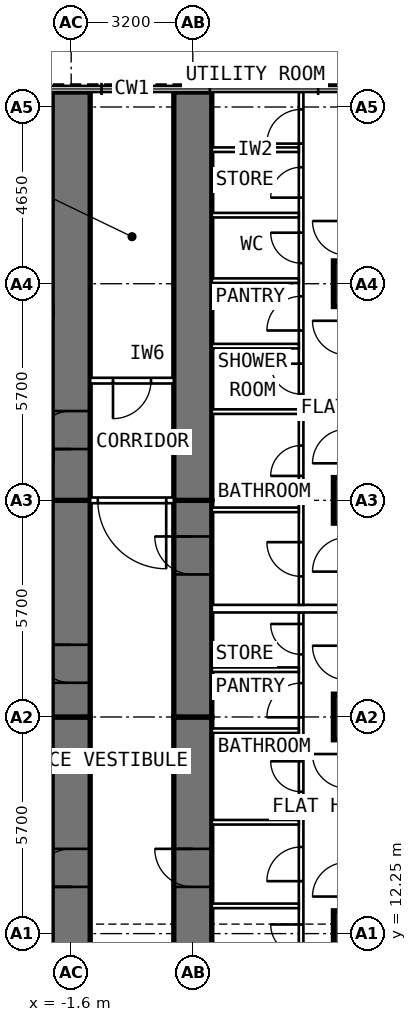
"""IFC4 building model, lengths in metres.
Left out: names, types, materials, properties, quantities, classifications, styles, units other than length and angle.
Written with IfcOpenShell. Run it as: python <this file> out.ifc"""

import sys

from ifc_helpers import new_model, si_unit, direction, frame, frame_2d, origin, origin_2d, place, context, subcontext, project, spatial, rectangle, extrude, element, fill, save


model = new_model("IFC4")
c1 = context("Model", 3, precision=1e-05, world=origin(), true_north=direction((0.0, 1.0)))
c2 = subcontext(c1, "Body", "Model", "MODEL_VIEW")
j1 = project(units=[si_unit("LENGTHUNIT", "METRE"), si_unit("PLANEANGLEUNIT", "RADIAN")], contexts=[c1])
p1 = place(None, origin())
s1 = spatial("IfcSite", under=j1, at=p1, CompositionType="ELEMENT")
p2 = place(p1, origin())
s2 = spatial("IfcBuilding", under=s1, at=p2, CompositionType="ELEMENT")
p3 = place(p2, frame((0.0, 0.0, 88.0)))
s3 = spatial("IfcBuildingStorey", under=s2, at=p3, CompositionType="ELEMENT", Elevation=88.0)
for number, where, z_axis, x_axis in (
    (1, (5.9, 12.25, 0.0), (0.0, 0.0, 1.0), (0.0, 1.0, 0.0)),
    (2, (5.9, 17.95, 0.0), (0.0, 0.0, 1.0), (0.0, 1.0, 0.0)),
    (3, (5.9, 23.65, 0.0), (0.0, 0.0, 1.0), (0.0, 1.0, 0.0)),
    (4, (5.9, 29.35, 0.0), (0.0, 0.0, 1.0), (0.0, 1.0, 0.0)),
):
    element("IfcColumn", number, at=place(p3, frame(where, z_axis=z_axis, x_axis=x_axis)), inside=s3, PredefinedType="COLUMN", context=c2, shape_type="SweptSolid", body=[
        extrude(rectangle(XDim=1.2, YDim=1.2, at=origin_2d()), origin(), (0.0, 0.0, 1.0), 3.6),
    ])
p4 = place(p3, frame((-1.6, 9.6, 0.0), z_axis=(0.0, 0.0, 1.0), x_axis=(0.0, 1.0, 0.0)))
e5 = element("IfcWall", 5, at=p4, inside=s3, PredefinedType="SHEAR", context=c2, shape_type="SweptSolid", body=[
    extrude(rectangle(XDim=8.35, YDim=1.0, at=frame_2d((4.175, 0.0))), origin(), (0.0, 0.0, 1.0), 3.6),
])
p5 = place(p4, frame((3.88, 0.0, 0.0)))
e6 = element("IfcOpeningElement", 6, at=p5, cuts=e5, PredefinedType="OPENING", context=c2, shape_type="SweptSolid", body=[
    extrude(rectangle(XDim=1.0, YDim=2.1, at=frame_2d((0.5, 1.05))), frame((0.0, 0.512, 0.0), z_axis=(0.0, -1.0, 0.0), x_axis=(1.0, 0.0, 0.0)), (0.0, 0.0, 1.0), 1.024),
])
p6 = place(p3, frame((-1.6, 17.95, 0.0), z_axis=(0.0, 0.0, 1.0), x_axis=(0.0, 1.0, 0.0)))
e7 = element("IfcWall", 7, at=p6, inside=s3, PredefinedType="SHEAR", context=c2, shape_type="SweptSolid", body=[
    extrude(rectangle(XDim=5.7, YDim=1.0, at=frame_2d((2.85, 0.0))), origin(), (0.0, 0.0, 1.0), 3.6),
])
p7 = place(p6, frame((0.9, 0.0, 0.0)))
e8 = element("IfcOpeningElement", 8, at=p7, cuts=e7, PredefinedType="OPENING", context=c2, shape_type="SweptSolid", body=[
    extrude(rectangle(XDim=1.0, YDim=2.1, at=frame_2d((0.5, 1.05))), frame((0.0, 0.512, 0.0), z_axis=(0.0, -1.0, 0.0), x_axis=(1.0, 0.0, 0.0)), (0.0, 0.0, 1.0), 1.024),
])
p8 = place(p3, frame((-1.6, 23.65, 0.0), z_axis=(0.0, 0.0, 1.0), x_axis=(0.0, 1.0, 0.0)))
e9 = element("IfcWall", 9, at=p8, inside=s3, PredefinedType="SHEAR", context=c2, shape_type="SweptSolid", body=[
    extrude(rectangle(XDim=10.745, YDim=1.0, at=frame_2d((5.373, 0.0))), origin(), (0.0, 0.0, 1.0), 3.6),
])
p9 = place(p8, frame((1.35, 0.0, 0.0)))
e10 = element("IfcOpeningElement", 10, at=p9, cuts=e9, PredefinedType="OPENING", context=c2, shape_type="SweptSolid", body=[
    extrude(rectangle(XDim=1.0, YDim=2.1, at=frame_2d((0.5, 1.05))), frame((0.0, 0.512, 0.0), z_axis=(0.0, -1.0, 0.0), x_axis=(1.0, 0.0, 0.0)), (0.0, 0.0, 1.0), 1.024),
])
p10 = place(p3, frame((1.6, 9.6, 0.0), z_axis=(0.0, 0.0, 1.0), x_axis=(0.0, 1.0, 0.0)))
e11 = element("IfcWall", 11, at=p10, inside=s3, PredefinedType="SHEAR", context=c2, shape_type="SweptSolid", body=[
    extrude(rectangle(XDim=8.35, YDim=1.0, at=frame_2d((4.175, 0.0))), origin(), (0.0, 0.0, 1.0), 3.6),
])
p11 = place(p10, frame((3.88, 0.0, 0.0)))
e12 = element("IfcOpeningElement", 12, at=p11, cuts=e11, PredefinedType="OPENING", context=c2, shape_type="SweptSolid", body=[
    extrude(rectangle(XDim=1.0, YDim=2.1, at=frame_2d((0.5, 1.05))), frame((0.0, 0.512, 0.0), z_axis=(0.0, -1.0, 0.0), x_axis=(1.0, 0.0, 0.0)), (0.0, 0.0, 1.0), 1.024),
])
p12 = place(p3, frame((1.6, 17.95, 0.0), z_axis=(0.0, 0.0, 1.0), x_axis=(0.0, 1.0, 0.0)))
e13 = element("IfcWall", 13, at=p12, inside=s3, PredefinedType="SHEAR", context=c2, shape_type="SweptSolid", body=[
    extrude(rectangle(XDim=5.7, YDim=1.0, at=frame_2d((2.85, 0.0))), origin(), (0.0, 0.0, 1.0), 3.6),
])
p13 = place(p12, frame((3.75, 0.0, 0.0)))
e14 = element("IfcOpeningElement", 14, at=p13, cuts=e13, PredefinedType="OPENING", context=c2, shape_type="SweptSolid", body=[
    extrude(rectangle(XDim=1.0, YDim=2.1, at=frame_2d((0.5, 1.05))), frame((0.0, 0.512, 0.0), z_axis=(0.0, -1.0, 0.0), x_axis=(1.0, 0.0, 0.0)), (0.0, 0.0, 1.0), 1.024),
])
p14 = place(p3, frame((1.6, 23.65, 0.0), z_axis=(0.0, 0.0, 1.0), x_axis=(0.0, 1.0, 0.0)))
e15 = element("IfcWall", 15, at=p14, inside=s3, PredefinedType="SHEAR", context=c2, shape_type="SweptSolid", body=[
    extrude(rectangle(XDim=10.745, YDim=1.0, at=frame_2d((5.373, 0.0))), origin(), (0.0, 0.0, 1.0), 3.6),
])
p15 = place(p3, frame((-2.1, 17.95, 0.0), z_axis=(0.0, 0.0, 1.0), x_axis=(-1.0, 0.0, 0.0)))
e16 = element("IfcWall", 16, at=p15, inside=s3, PredefinedType="PARTITIONING", context=c2, shape_type="SweptSolid", body=[
    extrude(rectangle(XDim=8.6, YDim=0.2, at=frame_2d((4.3, 0.0))), origin(), (0.0, 0.0, 1.0), 2.45),
])
p16 = place(p3, frame((4.45, 10.1, 0.0), z_axis=(0.0, 0.0, 1.0), x_axis=(0.0, 1.0, 0.0)))
e17 = element("IfcWall", 17, at=p16, inside=s3, PredefinedType="PARTITIONING", context=c2, shape_type="SweptSolid", body=[
    extrude(rectangle(XDim=10.6, YDim=0.12, at=frame_2d((5.3, 0.0))), origin(), (0.0, 0.0, 1.0), 3.35),
])
p17 = place(p16, frame((1.59, 0.0, 0.0)))
e18 = element("IfcOpeningElement", 18, at=p17, cuts=e17, PredefinedType="OPENING", context=c2, shape_type="SweptSolid", body=[
    extrude(rectangle(XDim=0.8, YDim=2.1, at=frame_2d((0.4, 1.05))), frame((0.0, 0.072, 0.0), z_axis=(0.0, -1.0, 0.0), x_axis=(1.0, 0.0, 0.0)), (0.0, 0.0, 1.0), 0.144),
])
p18 = place(p16, frame((3.53, 0.0, 0.0)))
e19 = element("IfcOpeningElement", 19, at=p18, cuts=e17, PredefinedType="OPENING", context=c2, shape_type="SweptSolid", body=[
    extrude(rectangle(XDim=0.9, YDim=2.1, at=frame_2d((0.45, 1.05))), frame((0.0, 0.072, 0.0), z_axis=(0.0, -1.0, 0.0), x_axis=(1.0, 0.0, 0.0)), (0.0, 0.0, 1.0), 0.144),
])
p19 = place(p16, frame((5.884, 0.0, 0.0)))
e20 = element("IfcOpeningElement", 20, at=p19, cuts=e17, PredefinedType="OPENING", context=c2, shape_type="SweptSolid", body=[
    extrude(rectangle(XDim=0.8, YDim=2.1, at=frame_2d((0.4, 1.05))), frame((0.0, 0.072, 0.0), z_axis=(0.0, -1.0, 0.0), x_axis=(1.0, 0.0, 0.0)), (0.0, 0.0, 1.0), 0.144),
])
p20 = place(p16, frame((7.842, 0.0, 0.0)))
e21 = element("IfcOpeningElement", 21, at=p20, cuts=e17, PredefinedType="OPENING", context=c2, shape_type="SweptSolid", body=[
    extrude(rectangle(XDim=0.9, YDim=2.1, at=frame_2d((0.45, 1.05))), frame((0.0, 0.072, 0.0), z_axis=(0.0, -1.0, 0.0), x_axis=(1.0, 0.0, 0.0)), (0.0, 0.0, 1.0), 0.144),
])
p21 = place(p16, frame((9.497, 0.0, 0.0)))
e22 = element("IfcOpeningElement", 22, at=p21, cuts=e17, PredefinedType="OPENING", context=c2, shape_type="SweptSolid", body=[
    extrude(rectangle(XDim=0.8, YDim=2.1, at=frame_2d((0.4, 1.05))), frame((0.0, 0.072, 0.0), z_axis=(0.0, -1.0, 0.0), x_axis=(1.0, 0.0, 0.0)), (0.0, 0.0, 1.0), 0.144),
])
for number, where, z_axis, x_axis in (
    (23, (2.1, 12.98, 0.0), (0.0, 0.0, 1.0), (1.0, 0.0, 0.0)),
    (24, (2.1, 15.18, 0.0), (0.0, 0.0, 1.0), (1.0, 0.0, 0.0)),
):
    element("IfcWall", number, at=place(p3, frame(where, z_axis=z_axis, x_axis=x_axis)), inside=s3, PredefinedType="PARTITIONING", context=c2, shape_type="SweptSolid", body=[
        extrude(rectangle(XDim=2.29, YDim=0.12, at=frame_2d((1.145, 0.0))), origin(), (0.0, 0.0, 1.0), 3.35),
    ])
p22 = place(p3, frame((2.1, 17.589, 0.0), z_axis=(0.0, 0.0, 1.0), x_axis=(1.0, 0.0, 0.0)))
e25 = element("IfcWall", 25, at=p22, inside=s3, PredefinedType="PARTITIONING", context=c2, shape_type="SweptSolid", body=[
    extrude(rectangle(XDim=2.29, YDim=0.12, at=frame_2d((1.145, 0.0))), origin(), (0.0, 0.0, 1.0), 2.45),
])
p23 = place(p3, frame((2.1, 19.194, 0.0), z_axis=(0.0, 0.0, 1.0), x_axis=(1.0, 0.0, 0.0)))
e26 = element("IfcWall", 26, at=p23, inside=s3, PredefinedType="PARTITIONING", context=c2, shape_type="SweptSolid", body=[
    extrude(rectangle(XDim=2.29, YDim=0.12, at=frame_2d((1.145, 0.0))), origin(), (0.0, 0.0, 1.0), 3.35),
])
p24 = place(p3, frame((4.45, 20.9, 0.0), z_axis=(0.0, 0.0, 1.0), x_axis=(0.0, 1.0, 0.0)))
e27 = element("IfcWall", 27, at=p24, inside=s3, PredefinedType="PARTITIONING", context=c2, shape_type="SweptSolid", body=[
    extrude(rectangle(XDim=13.495, YDim=0.12, at=frame_2d((6.748, 0.0))), origin(), (0.0, 0.0, 1.0), 3.35),
])
p25 = place(p24, frame((0.75, 0.0, 0.0)))
e28 = element("IfcOpeningElement", 28, at=p25, cuts=e27, PredefinedType="OPENING", context=c2, shape_type="SweptSolid", body=[
    extrude(rectangle(XDim=0.9, YDim=2.1, at=frame_2d((0.45, 1.05))), frame((0.0, 0.072, 0.0), z_axis=(0.0, -1.0, 0.0), x_axis=(1.0, 0.0, 0.0)), (0.0, 0.0, 1.0), 0.144),
])
p26 = place(p24, frame((3.392, 0.0, 0.0)))
e29 = element("IfcOpeningElement", 29, at=p26, cuts=e27, PredefinedType="OPENING", context=c2, shape_type="SweptSolid", body=[
    extrude(rectangle(XDim=0.8, YDim=2.1, at=frame_2d((0.4, 1.05))), frame((0.0, 0.072, 0.0), z_axis=(0.0, -1.0, 0.0), x_axis=(1.0, 0.0, 0.0)), (0.0, 0.0, 1.0), 0.144),
])
p27 = place(p24, frame((5.546, 0.0, 0.0)))
e30 = element("IfcOpeningElement", 30, at=p27, cuts=e27, PredefinedType="OPENING", context=c2, shape_type="SweptSolid", body=[
    extrude(rectangle(XDim=0.8, YDim=2.1, at=frame_2d((0.4, 1.05))), frame((0.0, 0.072, 0.0), z_axis=(0.0, -1.0, 0.0), x_axis=(1.0, 0.0, 0.0)), (0.0, 0.0, 1.0), 0.144),
])
p28 = place(p24, frame((7.219, 0.0, 0.0)))
e31 = element("IfcOpeningElement", 31, at=p28, cuts=e27, PredefinedType="OPENING", context=c2, shape_type="SweptSolid", body=[
    extrude(rectangle(XDim=0.9, YDim=2.1, at=frame_2d((0.45, 1.05))), frame((0.0, 0.072, 0.0), z_axis=(0.0, -1.0, 0.0), x_axis=(1.0, 0.0, 0.0)), (0.0, 0.0, 1.0), 0.144),
])
p29 = place(p24, frame((8.992, 0.0, 0.0)))
e32 = element("IfcOpeningElement", 32, at=p29, cuts=e27, PredefinedType="OPENING", context=c2, shape_type="SweptSolid", body=[
    extrude(rectangle(XDim=0.8, YDim=2.1, at=frame_2d((0.4, 1.05))), frame((0.0, 0.072, 0.0), z_axis=(0.0, -1.0, 0.0), x_axis=(1.0, 0.0, 0.0)), (0.0, 0.0, 1.0), 0.144),
])
p30 = place(p24, frame((10.715, 0.0, 0.0)))
e33 = element("IfcOpeningElement", 33, at=p30, cuts=e27, PredefinedType="OPENING", context=c2, shape_type="SweptSolid", body=[
    extrude(rectangle(XDim=0.8, YDim=2.1, at=frame_2d((0.4, 1.05))), frame((0.0, 0.072, 0.0), z_axis=(0.0, -1.0, 0.0), x_axis=(1.0, 0.0, 0.0)), (0.0, 0.0, 1.0), 0.144),
])
p31 = place(p24, frame((12.137, 0.0, 0.0)))
e34 = element("IfcOpeningElement", 34, at=p31, cuts=e27, PredefinedType="OPENING", context=c2, shape_type="SweptSolid", body=[
    extrude(rectangle(XDim=0.9, YDim=2.1, at=frame_2d((0.45, 1.05))), frame((0.0, 0.072, 0.0), z_axis=(0.0, -1.0, 0.0), x_axis=(1.0, 0.0, 0.0)), (0.0, 0.0, 1.0), 0.144),
])
p32 = place(p3, frame((2.1, 23.4, 0.0), z_axis=(0.0, 0.0, 1.0), x_axis=(1.0, 0.0, 0.0)))
e35 = element("IfcWall", 35, at=p32, inside=s3, PredefinedType="PARTITIONING", context=c2, shape_type="SweptSolid", body=[
    extrude(rectangle(XDim=2.29, YDim=0.12, at=frame_2d((1.145, 0.0))), origin(), (0.0, 0.0, 1.0), 2.45),
])
for number, where, z_axis, x_axis in (
    (36, (2.1, 25.985, 0.0), (0.0, 0.0, 1.0), (1.0, 0.0, 0.0)),
    (37, (2.1, 27.708, 0.0), (0.0, 0.0, 1.0), (1.0, 0.0, 0.0)),
):
    element("IfcWall", number, at=place(p3, frame(where, z_axis=z_axis, x_axis=x_axis)), inside=s3, PredefinedType="PARTITIONING", context=c2, shape_type="SweptSolid", body=[
        extrude(rectangle(XDim=2.29, YDim=0.12, at=frame_2d((1.145, 0.0))), origin(), (0.0, 0.0, 1.0), 3.35),
    ])
p33 = place(p3, frame((2.1, 29.431, 0.0), z_axis=(0.0, 0.0, 1.0), x_axis=(1.0, 0.0, 0.0)))
e38 = element("IfcWall", 38, at=p33, inside=s3, PredefinedType="PARTITIONING", context=c2, shape_type="SweptSolid", body=[
    extrude(rectangle(XDim=2.29, YDim=0.12, at=frame_2d((1.145, 0.0))), origin(), (0.0, 0.0, 1.0), 2.45),
])
for number, where, z_axis, x_axis in (
    (39, (2.1, 31.154, 0.0), (0.0, 0.0, 1.0), (1.0, 0.0, 0.0)),
    (40, (2.1, 32.877, 0.0), (0.0, 0.0, 1.0), (1.0, 0.0, 0.0)),
):
    element("IfcWall", number, at=place(p3, frame(where, z_axis=z_axis, x_axis=x_axis)), inside=s3, PredefinedType="PARTITIONING", context=c2, shape_type="SweptSolid", body=[
        extrude(rectangle(XDim=2.29, YDim=0.12, at=frame_2d((1.145, 0.0))), origin(), (0.0, 0.0, 1.0), 3.35),
    ])
p34 = place(p3, frame((2.1, 20.8, 0.0), z_axis=(0.0, 0.0, 1.0), x_axis=(1.0, 0.0, 0.0)))
e41 = element("IfcWall", 41, at=p34, inside=s3, PredefinedType="PARTITIONING", context=c2, shape_type="SweptSolid", body=[
    extrude(rectangle(XDim=8.6, YDim=0.2, at=frame_2d((4.3, 0.0))), origin(), (0.0, 0.0, 1.0), 3.35),
])
p35 = place(p3, frame((1.1, 26.8, 0.0), z_axis=(0.0, 0.0, 1.0), x_axis=(-1.0, 0.0, 0.0)))
e42 = element("IfcWall", 42, at=p35, inside=s3, PredefinedType="PARTITIONING", context=c2, shape_type="SweptSolid", body=[
    extrude(rectangle(XDim=2.2, YDim=0.15, at=frame_2d((1.1, 0.0))), origin(), (0.0, 0.0, 1.0), 3.35),
])
p36 = place(p35, frame((0.6, 0.0, 0.0)))
e43 = element("IfcOpeningElement", 43, at=p36, cuts=e42, PredefinedType="OPENING", context=c2, shape_type="SweptSolid", body=[
    extrude(rectangle(XDim=1.0, YDim=2.1, at=frame_2d((0.5, 1.05))), frame((0.0, 0.087, 0.0), z_axis=(0.0, -1.0, 0.0), x_axis=(1.0, 0.0, 0.0)), (0.0, 0.0, 1.0), 0.174),
])
p37 = place(p3, frame((1.1, 23.65, 0.0), z_axis=(0.0, 0.0, 1.0), x_axis=(-1.0, 0.0, 0.0)))
e44 = element("IfcWall", 44, at=p37, inside=s3, PredefinedType="PARTITIONING", context=c2, shape_type="SweptSolid", body=[
    extrude(rectangle(XDim=2.2, YDim=0.15, at=frame_2d((1.1, 0.0))), origin(), (0.0, 0.0, 1.0), 3.35),
])
p38 = place(p37, frame((0.2, 0.0, 0.0)))
e45 = element("IfcOpeningElement", 45, at=p38, cuts=e44, PredefinedType="OPENING", context=c2, shape_type="SweptSolid", body=[
    extrude(rectangle(XDim=1.8, YDim=2.1, at=frame_2d((0.9, 1.05))), frame((0.0, 0.087, 0.0), z_axis=(0.0, -1.0, 0.0), x_axis=(1.0, 0.0, 0.0)), (0.0, 0.0, 1.0), 0.174),
])
p39 = place(p5, origin())
e46 = element("IfcDoor", 46, at=p39, inside=s3, OperationType="SINGLE_SWING_LEFT", PredefinedType="DOOR", context=c2, shape_type="SweptSolid", body=[
    extrude(rectangle(XDim=1.0, YDim=2.1, at=frame_2d((0.5, 1.05))), frame((0.0, 0.25, 0.0), z_axis=(0.0, -1.0, 0.0), x_axis=(1.0, 0.0, 0.0)), (0.0, 0.0, 1.0), 0.5),
])
fill(e6, e46)
p40 = place(p7, origin())
e47 = element("IfcDoor", 47, at=p40, inside=s3, OperationType="SINGLE_SWING_RIGHT", PredefinedType="DOOR", context=c2, shape_type="SweptSolid", body=[
    extrude(rectangle(XDim=1.0, YDim=2.1, at=frame_2d((0.5, 1.05))), frame((0.0, 0.25, 0.0), z_axis=(0.0, -1.0, 0.0), x_axis=(1.0, 0.0, 0.0)), (0.0, 0.0, 1.0), 0.5),
])
fill(e8, e47)
p41 = place(p11, origin())
e48 = element("IfcDoor", 48, at=p41, inside=s3, OperationType="SINGLE_SWING_RIGHT", PredefinedType="DOOR", context=c2, shape_type="SweptSolid", body=[
    extrude(rectangle(XDim=1.0, YDim=2.1, at=frame_2d((0.5, 1.05))), frame((0.0, 0.25, 0.0), z_axis=(0.0, -1.0, 0.0), x_axis=(1.0, 0.0, 0.0)), (0.0, 0.0, 1.0), 0.5),
])
fill(e12, e48)
p42 = place(p17, origin())
e49 = element("IfcDoor", 49, at=p42, inside=s3, OperationType="SINGLE_SWING_RIGHT", PredefinedType="DOOR", context=c2, shape_type="SweptSolid", body=[
    extrude(rectangle(XDim=0.8, YDim=2.1, at=frame_2d((0.4, 1.05))), frame((0.0, 0.025, 0.0), z_axis=(0.0, -1.0, 0.0), x_axis=(1.0, 0.0, 0.0)), (0.0, 0.0, 1.0), 0.05),
])
fill(e18, e49)
p43 = place(p18, origin())
e50 = element("IfcDoor", 50, at=p43, inside=s3, OperationType="SINGLE_SWING_LEFT", PredefinedType="DOOR", context=c2, shape_type="SweptSolid", body=[
    extrude(rectangle(XDim=0.9, YDim=2.1, at=frame_2d((0.45, 1.05))), frame((0.0, 0.025, 0.0), z_axis=(0.0, -1.0, 0.0), x_axis=(1.0, 0.0, 0.0)), (0.0, 0.0, 1.0), 0.05),
])
fill(e19, e50)
p44 = place(p19, origin())
e51 = element("IfcDoor", 51, at=p44, inside=s3, OperationType="SINGLE_SWING_RIGHT", PredefinedType="DOOR", context=c2, shape_type="SweptSolid", body=[
    extrude(rectangle(XDim=0.8, YDim=2.1, at=frame_2d((0.4, 1.05))), frame((0.0, 0.025, 0.0), z_axis=(0.0, -1.0, 0.0), x_axis=(1.0, 0.0, 0.0)), (0.0, 0.0, 1.0), 0.05),
])
fill(e20, e51)
p45 = place(p20, origin())
e52 = element("IfcDoor", 52, at=p45, inside=s3, OperationType="SINGLE_SWING_LEFT", PredefinedType="DOOR", context=c2, shape_type="SweptSolid", body=[
    extrude(rectangle(XDim=0.9, YDim=2.1, at=frame_2d((0.45, 1.05))), frame((0.0, 0.025, 0.0), z_axis=(0.0, -1.0, 0.0), x_axis=(1.0, 0.0, 0.0)), (0.0, 0.0, 1.0), 0.05),
])
fill(e21, e52)
p46 = place(p21, origin())
e53 = element("IfcDoor", 53, at=p46, inside=s3, OperationType="SINGLE_SWING_RIGHT", PredefinedType="DOOR", context=c2, shape_type="SweptSolid", body=[
    extrude(rectangle(XDim=0.8, YDim=2.1, at=frame_2d((0.4, 1.05))), frame((0.0, 0.025, 0.0), z_axis=(0.0, -1.0, 0.0), x_axis=(1.0, 0.0, 0.0)), (0.0, 0.0, 1.0), 0.05),
])
fill(e22, e53)
p47 = place(p13, origin())
e54 = element("IfcDoor", 54, at=p47, inside=s3, OperationType="SINGLE_SWING_RIGHT", PredefinedType="DOOR", context=c2, shape_type="SweptSolid", body=[
    extrude(rectangle(XDim=1.0, YDim=2.1, at=frame_2d((0.5, 1.05))), frame((0.0, 0.25, 0.0), z_axis=(0.0, -1.0, 0.0), x_axis=(1.0, 0.0, 0.0)), (0.0, 0.0, 1.0), 0.5),
])
fill(e14, e54)
p48 = place(p25, origin())
e55 = element("IfcDoor", 55, at=p48, inside=s3, OperationType="SINGLE_SWING_RIGHT", PredefinedType="DOOR", context=c2, shape_type="SweptSolid", body=[
    extrude(rectangle(XDim=0.9, YDim=2.1, at=frame_2d((0.45, 1.05))), frame((0.0, 0.025, 0.0), z_axis=(0.0, -1.0, 0.0), x_axis=(1.0, 0.0, 0.0)), (0.0, 0.0, 1.0), 0.05),
])
fill(e28, e55)
p49 = place(p26, origin())
e56 = element("IfcDoor", 56, at=p49, inside=s3, OperationType="SINGLE_SWING_LEFT", PredefinedType="DOOR", context=c2, shape_type="SweptSolid", body=[
    extrude(rectangle(XDim=0.8, YDim=2.1, at=frame_2d((0.4, 1.05))), frame((0.0, 0.025, 0.0), z_axis=(0.0, -1.0, 0.0), x_axis=(1.0, 0.0, 0.0)), (0.0, 0.0, 1.0), 0.05),
])
fill(e29, e56)
p50 = place(p27, origin())
e57 = element("IfcDoor", 57, at=p50, inside=s3, OperationType="SINGLE_SWING_RIGHT", PredefinedType="DOOR", context=c2, shape_type="SweptSolid", body=[
    extrude(rectangle(XDim=0.8, YDim=2.1, at=frame_2d((0.4, 1.05))), frame((0.0, 0.025, 0.0), z_axis=(0.0, -1.0, 0.0), x_axis=(1.0, 0.0, 0.0)), (0.0, 0.0, 1.0), 0.05),
])
fill(e30, e57)
p51 = place(p28, origin())
e58 = element("IfcDoor", 58, at=p51, inside=s3, OperationType="SINGLE_SWING_LEFT", PredefinedType="DOOR", context=c2, shape_type="SweptSolid", body=[
    extrude(rectangle(XDim=0.9, YDim=2.1, at=frame_2d((0.45, 1.05))), frame((0.0, 0.025, 0.0), z_axis=(0.0, -1.0, 0.0), x_axis=(1.0, 0.0, 0.0)), (0.0, 0.0, 1.0), 0.05),
])
fill(e31, e58)
p52 = place(p29, origin())
e59 = element("IfcDoor", 59, at=p52, inside=s3, OperationType="SINGLE_SWING_RIGHT", PredefinedType="DOOR", context=c2, shape_type="SweptSolid", body=[
    extrude(rectangle(XDim=0.8, YDim=2.1, at=frame_2d((0.4, 1.05))), frame((0.0, 0.025, 0.0), z_axis=(0.0, -1.0, 0.0), x_axis=(1.0, 0.0, 0.0)), (0.0, 0.0, 1.0), 0.05),
])
fill(e32, e59)
p53 = place(p30, origin())
e60 = element("IfcDoor", 60, at=p53, inside=s3, OperationType="SINGLE_SWING_LEFT", PredefinedType="DOOR", context=c2, shape_type="SweptSolid", body=[
    extrude(rectangle(XDim=0.8, YDim=2.1, at=frame_2d((0.4, 1.05))), frame((0.0, 0.025, 0.0), z_axis=(0.0, -1.0, 0.0), x_axis=(1.0, 0.0, 0.0)), (0.0, 0.0, 1.0), 0.05),
])
fill(e33, e60)
p54 = place(p31, origin())
e61 = element("IfcDoor", 61, at=p54, inside=s3, OperationType="SINGLE_SWING_LEFT", PredefinedType="DOOR", context=c2, shape_type="SweptSolid", body=[
    extrude(rectangle(XDim=0.9, YDim=2.1, at=frame_2d((0.45, 1.05))), frame((0.0, 0.025, 0.0), z_axis=(0.0, -1.0, 0.0), x_axis=(1.0, 0.0, 0.0)), (0.0, 0.0, 1.0), 0.05),
])
fill(e34, e61)
p55 = place(p36, origin())
e62 = element("IfcDoor", 62, at=p55, inside=s3, OperationType="SINGLE_SWING_RIGHT", PredefinedType="DOOR", context=c2, shape_type="SweptSolid", body=[
    extrude(rectangle(XDim=1.0, YDim=2.1, at=frame_2d((0.5, 1.05))), frame((0.0, 0.025, 0.0), z_axis=(0.0, -1.0, 0.0), x_axis=(1.0, 0.0, 0.0)), (0.0, 0.0, 1.0), 0.05),
])
fill(e43, e62)
p56 = place(p38, origin())
e63 = element("IfcDoor", 63, at=p56, inside=s3, OperationType="DOUBLE_DOOR_DOUBLE_SWING", PredefinedType="DOOR", context=c2, shape_type="SweptSolid", body=[
    extrude(rectangle(XDim=1.8, YDim=2.1, at=frame_2d((0.9, 1.05))), frame((0.0, 0.025, 0.0), z_axis=(0.0, -1.0, 0.0), x_axis=(1.0, 0.0, 0.0)), (0.0, 0.0, 1.0), 0.05),
])
fill(e45, e63)
p57 = place(p9, origin())
e64 = element("IfcDoor", 64, at=p57, inside=s3, OperationType="SINGLE_SWING_LEFT", PredefinedType="DOOR", context=c2, shape_type="SweptSolid", body=[
    extrude(rectangle(XDim=1.0, YDim=2.1, at=frame_2d((0.5, 1.05))), frame((0.0, 0.25, 0.0), z_axis=(0.0, -1.0, 0.0), x_axis=(1.0, 0.0, 0.0)), (0.0, 0.0, 1.0), 0.5),
])
fill(e10, e64)
save(model, sys.argv[1])
